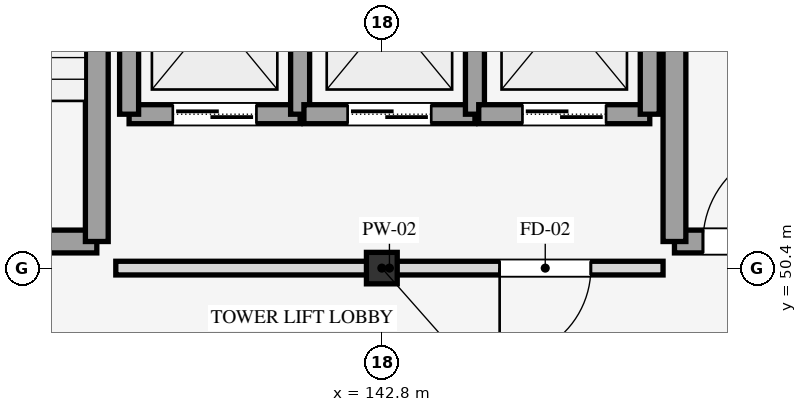
"""IFC4 building model, lengths in metres.
Left out: names, types, materials, properties, quantities, classifications, styles, units other than length and angle.
Written with IfcOpenShell. Run it as: python <this file> out.ifc"""

import sys

from ifc_helpers import new_model, si_unit, direction, frame, frame_2d, origin, origin_2d, place, context, subcontext, project, spatial, rectangle, i_section, extrude, element, fill, save


model = new_model("IFC4")
c1 = context("Model", 3, precision=1e-05, world=origin(), true_north=direction((0.0, 1.0)))
c2 = subcontext(c1, "Body", "Model", "MODEL_VIEW")
j1 = project(units=[si_unit("LENGTHUNIT", "METRE"), si_unit("PLANEANGLEUNIT", "RADIAN")], contexts=[c1])
p1 = place(None, origin())
s1 = spatial("IfcSite", under=j1, at=p1, CompositionType="ELEMENT")
p2 = place(p1, origin())
s2 = spatial("IfcBuilding", under=s1, at=p2, CompositionType="ELEMENT")
p3 = place(p2, frame((0.0, 0.0, -5.4)))
s3 = spatial("IfcBuildingStorey", under=s2, at=p3, CompositionType="ELEMENT", Elevation=-5.4)
p4 = place(p3, frame((142.8, 50.4, 0.0), z_axis=(0.0, 0.0, 1.0), x_axis=(1.0, 0.0, 0.0)))
e1 = element("IfcColumn", 1, at=p4, inside=s3, PredefinedType="COLUMN", context=c2, shape_type="SweptSolid", body=[
    extrude(i_section(OverallWidth=0.405, OverallDepth=0.414, WebThickness=0.018, FlangeThickness=0.028, FilletRadius=0.022, at=origin_2d()), origin(), (0.0, 0.0, 1.0), 5.4),
])
p5 = place(p3, frame((135.05, 50.75, 0.0), z_axis=(0.0, 0.0, 1.0), x_axis=(1.0, 0.0, 0.0)))
e2 = element("IfcWall", 2, at=p5, inside=s3, PredefinedType="SHEAR", context=c2, shape_type="SweptSolid", body=[
    extrude(rectangle(XDim=4.0, YDim=0.3, at=frame_2d((2.0, 0.0))), origin(), (0.0, 0.0, 1.0), 5.4),
])
p6 = place(p5, frame((0.375, 0.0, 0.0)))
e3 = element("IfcOpeningElement", 3, at=p6, cuts=e2, PredefinedType="OPENING", context=c2, shape_type="SweptSolid", body=[
    extrude(rectangle(XDim=1.25, YDim=2.15, at=frame_2d((0.625, 1.075))), frame((0.0, 0.16, 0.0), z_axis=(0.0, -1.0, 0.0), x_axis=(1.0, 0.0, 0.0)), (0.0, 0.0, 1.0), 0.32),
])
p7 = place(p3, frame((139.05, 50.75, 0.0), z_axis=(0.0, 0.0, 1.0), x_axis=(0.0, 1.0, 0.0)))
e4 = element("IfcWall", 4, at=p7, inside=s3, PredefinedType="SHEAR", context=c2, shape_type="SweptSolid", body=[
    extrude(rectangle(XDim=14.3, YDim=0.3, at=frame_2d((7.15, 0.0))), origin(), (0.0, 0.0, 1.0), 5.4),
])
p8 = place(p3, frame((146.65, 50.75, 0.0), z_axis=(0.0, 0.0, 1.0), x_axis=(1.0, 0.0, 0.0)))
e5 = element("IfcWall", 5, at=p8, inside=s3, PredefinedType="SHEAR", context=c2, shape_type="SweptSolid", body=[
    extrude(rectangle(XDim=4.0, YDim=0.3, at=frame_2d((2.0, 0.0))), origin(), (0.0, 0.0, 1.0), 5.4),
])
p9 = place(p8, frame((0.375, 0.0, 0.0)))
e6 = element("IfcOpeningElement", 6, at=p9, cuts=e5, PredefinedType="OPENING", context=c2, shape_type="SweptSolid", body=[
    extrude(rectangle(XDim=1.25, YDim=2.15, at=frame_2d((0.625, 1.075))), frame((0.0, 0.16, 0.0), z_axis=(0.0, -1.0, 0.0), x_axis=(1.0, 0.0, 0.0)), (0.0, 0.0, 1.0), 0.32),
])
p10 = place(p3, frame((146.65, 50.75, 0.0), z_axis=(0.0, 0.0, 1.0), x_axis=(0.0, 1.0, 0.0)))
e7 = element("IfcWall", 7, at=p10, inside=s3, PredefinedType="SHEAR", context=c2, shape_type="SweptSolid", body=[
    extrude(rectangle(XDim=14.3, YDim=0.3, at=frame_2d((7.15, 0.0))), origin(), (0.0, 0.0, 1.0), 5.4),
])
p11 = place(p3, frame((139.475, 52.425, 0.0), z_axis=(0.0, 0.0, 1.0), x_axis=(1.0, 0.0, 0.0)))
e8 = element("IfcWall", 8, at=p11, inside=s3, PredefinedType="SHEAR", context=c2, shape_type="SweptSolid", body=[
    extrude(rectangle(XDim=2.25, YDim=0.25, at=frame_2d((1.125, 0.0))), origin(), (0.0, 0.0, 1.0), 5.1),
])
p12 = place(p11, frame((0.575, 0.0, 0.0)))
e9 = element("IfcOpeningElement", 9, at=p12, cuts=e8, PredefinedType="OPENING", context=c2, shape_type="SweptSolid", body=[
    extrude(rectangle(XDim=1.1, YDim=2.15, at=frame_2d((0.55, 1.075))), frame((0.0, 0.135, 0.0), z_axis=(0.0, -1.0, 0.0), x_axis=(1.0, 0.0, 0.0)), (0.0, 0.0, 1.0), 0.27),
])
for number, where, z_axis, x_axis in (
    (10, (139.475, 52.425, 0.0), (0.0, 0.0, 1.0), (0.0, 1.0, 0.0)),
    (11, (141.725, 52.425, 0.0), (0.0, 0.0, 1.0), (0.0, 1.0, 0.0)),
):
    element("IfcWall", number, at=place(p3, frame(where, z_axis=z_axis, x_axis=x_axis)), inside=s3, PredefinedType="SHEAR", context=c2, shape_type="SweptSolid", body=[
        extrude(rectangle(XDim=2.65, YDim=0.25, at=frame_2d((1.325, 0.0))), origin(), (0.0, 0.0, 1.0), 5.1),
    ])
p13 = place(p3, frame((141.775, 52.425, 0.0), z_axis=(0.0, 0.0, 1.0), x_axis=(1.0, 0.0, 0.0)))
e12 = element("IfcWall", 12, at=p13, inside=s3, PredefinedType="SHEAR", context=c2, shape_type="SweptSolid", body=[
    extrude(rectangle(XDim=2.25, YDim=0.25, at=frame_2d((1.125, 0.0))), origin(), (0.0, 0.0, 1.0), 5.1),
])
p14 = place(p13, frame((0.575, 0.0, 0.0)))
e13 = element("IfcOpeningElement", 13, at=p14, cuts=e12, PredefinedType="OPENING", context=c2, shape_type="SweptSolid", body=[
    extrude(rectangle(XDim=1.1, YDim=2.15, at=frame_2d((0.55, 1.075))), frame((0.0, 0.135, 0.0), z_axis=(0.0, -1.0, 0.0), x_axis=(1.0, 0.0, 0.0)), (0.0, 0.0, 1.0), 0.27),
])
p15 = place(p3, frame((144.025, 52.425, 0.0), z_axis=(0.0, 0.0, 1.0), x_axis=(0.0, 1.0, 0.0)))
e14 = element("IfcWall", 14, at=p15, inside=s3, PredefinedType="SHEAR", context=c2, shape_type="SweptSolid", body=[
    extrude(rectangle(XDim=2.65, YDim=0.25, at=frame_2d((1.325, 0.0))), origin(), (0.0, 0.0, 1.0), 5.1),
])
p16 = place(p3, frame((144.075, 52.425, 0.0), z_axis=(0.0, 0.0, 1.0), x_axis=(1.0, 0.0, 0.0)))
e15 = element("IfcWall", 15, at=p16, inside=s3, PredefinedType="SHEAR", context=c2, shape_type="SweptSolid", body=[
    extrude(rectangle(XDim=2.25, YDim=0.25, at=frame_2d((1.125, 0.0))), origin(), (0.0, 0.0, 1.0), 5.1),
])
p17 = place(p16, frame((0.575, 0.0, 0.0)))
e16 = element("IfcOpeningElement", 16, at=p17, cuts=e15, PredefinedType="OPENING", context=c2, shape_type="SweptSolid", body=[
    extrude(rectangle(XDim=1.1, YDim=2.15, at=frame_2d((0.55, 1.075))), frame((0.0, 0.135, 0.0), z_axis=(0.0, -1.0, 0.0), x_axis=(1.0, 0.0, 0.0)), (0.0, 0.0, 1.0), 0.27),
])
p18 = place(p3, frame((146.325, 52.425, 0.0), z_axis=(0.0, 0.0, 1.0), x_axis=(0.0, 1.0, 0.0)))
e17 = element("IfcWall", 17, at=p18, inside=s3, PredefinedType="SHEAR", context=c2, shape_type="SweptSolid", body=[
    extrude(rectangle(XDim=2.65, YDim=0.25, at=frame_2d((1.325, 0.0))), origin(), (0.0, 0.0, 1.0), 5.1),
])
p19 = place(p3, frame((139.3, 50.4, 0.0), z_axis=(0.0, 0.0, 1.0), x_axis=(1.0, 0.0, 0.0)))
e18 = element("IfcWall", 18, at=p19, inside=s3, PredefinedType="PARTITIONING", context=c2, shape_type="SweptSolid", body=[
    extrude(rectangle(XDim=7.2, YDim=0.18, at=frame_2d((3.6, 0.0))), origin(), (0.0, 0.0, 1.0), 4.44),
])
p20 = place(p19, frame((5.05, 0.0, 0.0)))
e19 = element("IfcOpeningElement", 19, at=p20, cuts=e18, PredefinedType="OPENING", context=c2, shape_type="SweptSolid", body=[
    extrude(rectangle(XDim=1.2, YDim=2.15, at=frame_2d((0.6, 1.075))), frame((0.0, 0.1, 0.0), z_axis=(0.0, -1.0, 0.0), x_axis=(1.0, 0.0, 0.0)), (0.0, 0.0, 1.0), 0.2),
])
p21 = place(p9, origin())
e20 = element("IfcDoor", 20, at=p21, inside=s3, OperationType="SINGLE_SWING_RIGHT", PredefinedType="DOOR", context=c2, shape_type="SweptSolid", body=[
    extrude(rectangle(XDim=1.25, YDim=2.15, at=frame_2d((0.625, 1.075))), frame((0.0, 0.025, 0.0), z_axis=(0.0, -1.0, 0.0), x_axis=(1.0, 0.0, 0.0)), (0.0, 0.0, 1.0), 0.05),
])
fill(e6, e20)
p22 = place(p12, origin())
e21 = element("IfcDoor", 21, at=p22, inside=s3, OperationType="DOUBLE_DOOR_SLIDING", PredefinedType="DOOR", context=c2, shape_type="SweptSolid", body=[
    extrude(rectangle(XDim=1.1, YDim=2.15, at=frame_2d((0.55, 1.075))), frame((0.0, 0.025, 0.0), z_axis=(0.0, -1.0, 0.0), x_axis=(1.0, 0.0, 0.0)), (0.0, 0.0, 1.0), 0.05),
])
fill(e9, e21)
p23 = place(p14, origin())
e22 = element("IfcDoor", 22, at=p23, inside=s3, OperationType="DOUBLE_DOOR_SLIDING", PredefinedType="DOOR", context=c2, shape_type="SweptSolid", body=[
    extrude(rectangle(XDim=1.1, YDim=2.15, at=frame_2d((0.55, 1.075))), frame((0.0, 0.025, 0.0), z_axis=(0.0, -1.0, 0.0), x_axis=(1.0, 0.0, 0.0)), (0.0, 0.0, 1.0), 0.05),
])
fill(e13, e22)
p24 = place(p17, origin())
e23 = element("IfcDoor", 23, at=p24, inside=s3, OperationType="DOUBLE_DOOR_SLIDING", PredefinedType="DOOR", context=c2, shape_type="SweptSolid", body=[
    extrude(rectangle(XDim=1.1, YDim=2.15, at=frame_2d((0.55, 1.075))), frame((0.0, 0.025, 0.0), z_axis=(0.0, -1.0, 0.0), x_axis=(1.0, 0.0, 0.0)), (0.0, 0.0, 1.0), 0.05),
])
fill(e16, e23)
p25 = place(p20, frame((1.2, 0.0, 0.0), z_axis=(0.0, 0.0, 1.0), x_axis=(-1.0, 0.0, 0.0)))
e24 = element("IfcDoor", 24, at=p25, inside=s3, OperationType="SINGLE_SWING_RIGHT", PredefinedType="DOOR", context=c2, shape_type="SweptSolid", body=[
    extrude(rectangle(XDim=1.2, YDim=2.15, at=frame_2d((0.6, 1.075))), frame((0.0, 0.025, 0.0), z_axis=(0.0, -1.0, 0.0), x_axis=(1.0, 0.0, 0.0)), (0.0, 0.0, 1.0), 0.05),
])
fill(e19, e24)
save(model, sys.argv[1])
